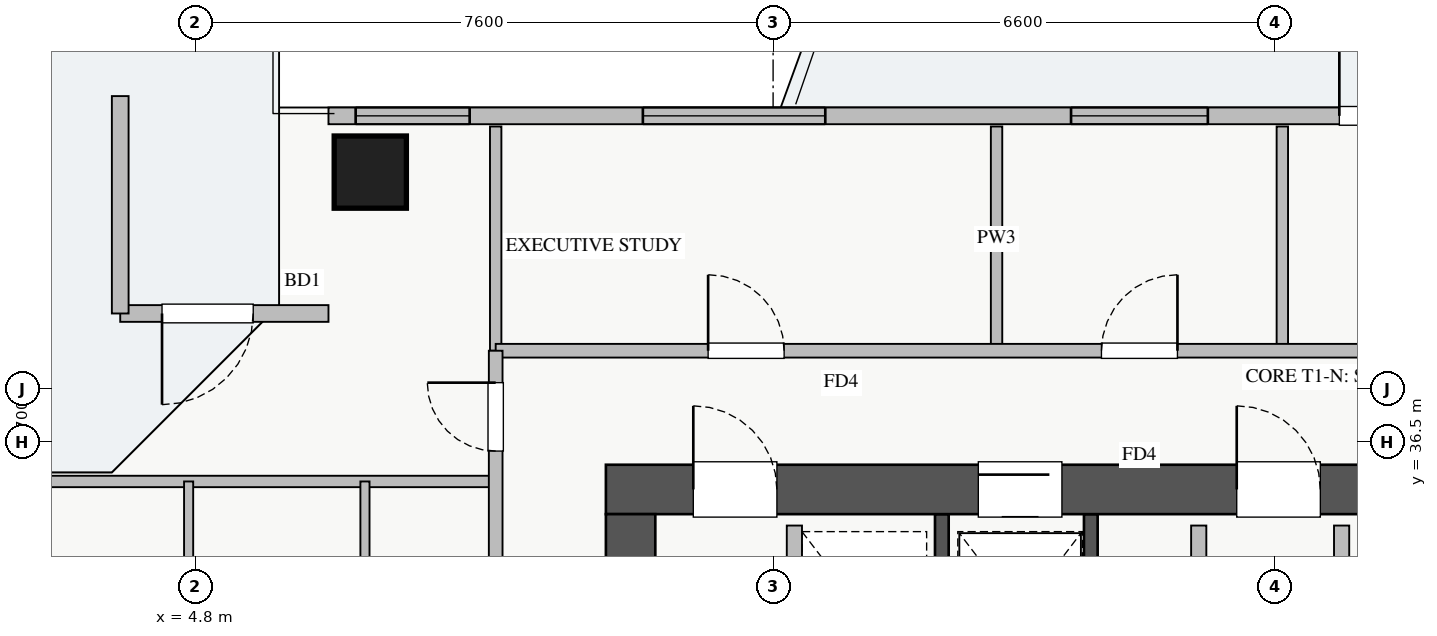
"""IFC4 building model, lengths in metres.
Left out: names, types, materials, properties, quantities, classifications, styles, units other than length and angle.
Written with IfcOpenShell. Run it as: python <this file> out.ifc"""

import sys

from ifc_helpers import new_model, si_unit, direction, frame, frame_2d, origin, origin_2d, place, context, subcontext, project, spatial, rectangle, extrude, source, transform, mapped, element, fill, save


model = new_model("IFC4")
c1 = context("Model", 3, precision=1e-05, world=origin(), true_north=direction((0.0, 1.0)))
c2 = subcontext(c1, "Body", "Model", "MODEL_VIEW")
j1 = project(units=[si_unit("LENGTHUNIT", "METRE"), si_unit("PLANEANGLEUNIT", "RADIAN")], contexts=[c1])
p1 = place(None, origin())
s1 = spatial("IfcSite", under=j1, at=p1, CompositionType="ELEMENT")
p2 = place(p1, origin())
s2 = spatial("IfcBuilding", under=s1, at=p2, CompositionType="ELEMENT")
p3 = place(p2, frame((0.0, 0.0, 143.75)))
s3 = spatial("IfcBuildingStorey", under=s2, at=p3, CompositionType="ELEMENT", Elevation=143.75)
for number, where, z_axis, x_axis in (
    (1, (14.62, 33.2, 0.0), (0.0, 0.0, 1.0), (0.0, 1.0, 0.0)),
    (2, (16.58, 33.2, 0.0), (0.0, 0.0, 1.0), (0.0, 1.0, 0.0)),
):
    element("IfcWall", number, at=place(p3, frame(where, z_axis=z_axis, x_axis=x_axis)), inside=s3, PredefinedType="SHEAR", context=c2, shape_type="SweptSolid", body=[
        extrude(rectangle(XDim=2.35, YDim=0.18, at=frame_2d((1.175, 0.0))), origin(), (0.0, 0.0, 1.0), 3.07),
    ])
p4 = place(p3, frame((10.2, 35.875, 0.0), z_axis=(0.0, 0.0, 1.0), x_axis=(1.0, 0.0, 0.0)))
e3 = element("IfcWall", 3, at=p4, inside=s3, PredefinedType="SHEAR", context=c2, shape_type="SweptSolid", body=[
    extrude(rectangle(XDim=17.6, YDim=0.65, at=frame_2d((8.8, 0.0))), origin(), (0.0, 0.0, 1.0), 3.25),
])
p5 = place(p4, frame((1.15, 0.0, 0.0)))
e4 = element("IfcOpeningElement", 4, at=p5, cuts=e3, PredefinedType="OPENING", context=c2, shape_type="SweptSolid", body=[
    extrude(rectangle(XDim=1.1, YDim=2.05, at=frame_2d((0.55, 1.025))), frame((0.0, 0.335, 0.0), z_axis=(0.0, -1.0, 0.0), x_axis=(1.0, 0.0, 0.0)), (0.0, 0.0, 1.0), 0.67),
])
p6 = place(p4, frame((8.3, 0.0, 0.0)))
e5 = element("IfcOpeningElement", 5, at=p6, cuts=e3, PredefinedType="OPENING", context=c2, shape_type="SweptSolid", body=[
    extrude(rectangle(XDim=1.1, YDim=2.05, at=frame_2d((0.55, 1.025))), frame((0.0, 0.335, 0.0), z_axis=(0.0, -1.0, 0.0), x_axis=(1.0, 0.0, 0.0)), (0.0, 0.0, 1.0), 0.67),
])
p7 = place(p4, frame((4.9, 0.0, 0.0)))
e6 = element("IfcOpeningElement", 6, at=p7, cuts=e3, PredefinedType="OPENING", context=c2, shape_type="SweptSolid", body=[
    extrude(rectangle(XDim=1.1, YDim=2.05, at=frame_2d((0.55, 1.025))), frame((0.0, 0.335, 0.0), z_axis=(0.0, -1.0, 0.0), x_axis=(1.0, 0.0, 0.0)), (0.0, 0.0, 1.0), 0.67),
])
p8 = place(p4, frame((14.74, 0.0, 0.0)))
e7 = element("IfcOpeningElement", 7, at=p8, cuts=e3, PredefinedType="OPENING", context=c2, shape_type="SweptSolid", body=[
    extrude(rectangle(XDim=1.0, YDim=2.05, at=frame_2d((0.5, 1.025))), frame((0.0, 0.335, 0.0), z_axis=(0.0, -1.0, 0.0), x_axis=(1.0, 0.0, 0.0)), (0.0, 0.0, 1.0), 0.67),
])
p9 = place(p4, frame((10.005, 0.0, 0.0)))
e8 = element("IfcOpeningElement", 8, at=p9, cuts=e3, PredefinedType="OPENING", context=c2, shape_type="SweptSolid", body=[
    extrude(rectangle(XDim=1.0, YDim=2.05, at=frame_2d((0.5, 1.025))), frame((0.0, 0.335, 0.0), z_axis=(0.0, -1.0, 0.0), x_axis=(1.0, 0.0, 0.0)), (0.0, 0.0, 1.0), 0.67),
])
p10 = place(p4, frame((11.55, 0.0, 0.0)))
e9 = element("IfcOpeningElement", 9, at=p10, cuts=e3, PredefinedType="OPENING", context=c2, shape_type="SweptSolid", body=[
    extrude(rectangle(XDim=1.0, YDim=2.05, at=frame_2d((0.5, 1.025))), frame((0.0, 0.335, 0.0), z_axis=(0.0, -1.0, 0.0), x_axis=(1.0, 0.0, 0.0)), (0.0, 0.0, 1.0), 0.67),
])
p11 = place(p4, frame((13.215, 0.0, 0.0)))
e10 = element("IfcOpeningElement", 10, at=p11, cuts=e3, PredefinedType="OPENING", context=c2, shape_type="SweptSolid", body=[
    extrude(rectangle(XDim=1.0, YDim=2.05, at=frame_2d((0.5, 1.025))), frame((0.0, 0.335, 0.0), z_axis=(0.0, -1.0, 0.0), x_axis=(1.0, 0.0, 0.0)), (0.0, 0.0, 1.0), 0.67),
])
p12 = place(p3, frame((10.525, 29.65, 0.0), z_axis=(0.0, 0.0, 1.0), x_axis=(0.0, 1.0, 0.0)))
e11 = element("IfcWall", 11, at=p12, inside=s3, PredefinedType="SHEAR", context=c2, shape_type="SweptSolid", body=[
    extrude(rectangle(XDim=5.9, YDim=0.65, at=frame_2d((2.95, 0.0))), origin(), (0.0, 0.0, 1.0), 3.25),
])
m1 = source(origin(), c2, "Body", "SweptSolid", [
    extrude(rectangle(XDim=0.95, YDim=0.95, at=origin_2d()), origin(), (0.0, 0.0, 1.0), 3.25),
])
p13 = place(p3, frame((7.1, 40.05, 0.0), z_axis=(0.0, 0.0, 1.0), x_axis=(1.0, 0.0, 0.0)))
e12 = element("IfcColumn", 12, at=p13, inside=s3, PredefinedType="COLUMN", context=c2, shape_type="MappedRepresentation", body=[
    mapped(m1, transform((0.0, 0.0, 0.0), x_axis=(1.0, 0.0, 0.0), y_axis=(0.0, 1.0, 0.0), z_axis=(0.0, 0.0, 1.0), scale=1.0)),
])
p14 = place(p3, frame((6.55, 40.79, 0.0), z_axis=(0.0, 0.0, 1.0), x_axis=(1.0, 0.0, 0.0)))
e13 = element("IfcWall", 13, at=p14, inside=s3, PredefinedType="STANDARD", context=c2, shape_type="SweptSolid", body=[
    extrude(rectangle(XDim=24.9, YDim=0.22, at=frame_2d((12.45, 0.0))), origin(), (0.0, 0.0, 1.0), 2.61),
])
p15 = place(p14, frame((13.3, 0.0, 0.0)))
e14 = element("IfcOpeningElement", 14, at=p15, cuts=e13, PredefinedType="OPENING", context=c2, shape_type="SweptSolid", body=[
    extrude(rectangle(XDim=1.2, YDim=2.1, at=frame_2d((0.6, 1.05))), frame((0.0, 0.12, 0.0), z_axis=(0.0, -1.0, 0.0), x_axis=(1.0, 0.0, 0.0)), (0.0, 0.0, 1.0), 0.24),
])
p16 = place(p14, frame((0.357, 0.0, 0.9)))
e15 = element("IfcOpeningElement", 15, at=p16, cuts=e13, PredefinedType="OPENING", context=c2, shape_type="SweptSolid", body=[
    extrude(rectangle(XDim=1.5, YDim=1.5, at=frame_2d((0.75, 0.75))), frame((0.0, 0.12, 0.0), z_axis=(0.0, -1.0, 0.0), x_axis=(1.0, 0.0, 0.0)), (0.0, 0.0, 1.0), 0.24),
])
p17 = place(p14, frame((9.77, 0.0, 0.9)))
e16 = element("IfcOpeningElement", 16, at=p17, cuts=e13, PredefinedType="OPENING", context=c2, shape_type="SweptSolid", body=[
    extrude(rectangle(XDim=1.8, YDim=1.5, at=frame_2d((0.9, 0.75))), frame((0.0, 0.12, 0.0), z_axis=(0.0, -1.0, 0.0), x_axis=(1.0, 0.0, 0.0)), (0.0, 0.0, 1.0), 0.24),
])
p18 = place(p14, frame((14.813, 0.0, 0.9)))
e17 = element("IfcOpeningElement", 17, at=p18, cuts=e13, PredefinedType="OPENING", context=c2, shape_type="SweptSolid", body=[
    extrude(rectangle(XDim=1.5, YDim=1.45, at=frame_2d((0.75, 0.725))), frame((0.0, 0.12, 0.0), z_axis=(0.0, -1.0, 0.0), x_axis=(1.0, 0.0, 0.0)), (0.0, 0.0, 1.0), 0.24),
])
p19 = place(p14, frame((20.738, 0.0, 0.9)))
e18 = element("IfcOpeningElement", 18, at=p19, cuts=e13, PredefinedType="OPENING", context=c2, shape_type="SweptSolid", body=[
    extrude(rectangle(XDim=2.1, YDim=1.48, at=frame_2d((1.05, 0.74))), frame((0.0, 0.12, 0.0), z_axis=(0.0, -1.0, 0.0), x_axis=(1.0, 0.0, 0.0)), (0.0, 0.0, 1.0), 0.24),
])
p20 = place(p14, frame((4.136, 0.0, 0.9)))
e19 = element("IfcOpeningElement", 19, at=p20, cuts=e13, PredefinedType="OPENING", context=c2, shape_type="SweptSolid", body=[
    extrude(rectangle(XDim=2.4, YDim=1.5, at=frame_2d((1.2, 0.75))), frame((0.0, 0.12, 0.0), z_axis=(0.0, -1.0, 0.0), x_axis=(1.0, 0.0, 0.0)), (0.0, 0.0, 1.0), 0.24),
])
p21 = place(p3, frame((3.81, 38.19, 0.0), z_axis=(0.0, 0.0, 1.0), x_axis=(1.0, 0.0, 0.0)))
e20 = element("IfcWall", 20, at=p21, inside=s3, PredefinedType="STANDARD", context=c2, shape_type="SweptSolid", body=[
    extrude(rectangle(XDim=2.74, YDim=0.22, at=frame_2d((1.37, 0.0))), origin(), (0.0, 0.0, 1.0), 2.61),
])
p22 = place(p21, frame((0.55, 0.0, 0.0)))
e21 = element("IfcOpeningElement", 21, at=p22, cuts=e20, PredefinedType="OPENING", context=c2, shape_type="SweptSolid", body=[
    extrude(rectangle(XDim=1.2, YDim=2.1, at=frame_2d((0.6, 1.05))), frame((0.0, 0.12, 0.0), z_axis=(0.0, -1.0, 0.0), x_axis=(1.0, 0.0, 0.0)), (0.0, 0.0, 1.0), 0.24),
])
p23 = place(p3, frame((3.81, 38.19, 0.0), z_axis=(0.0, 0.0, 1.0), x_axis=(0.0, 1.0, 0.0)))
e22 = element("IfcWall", 22, at=p23, inside=s3, PredefinedType="STANDARD", context=c2, shape_type="SweptSolid", body=[
    extrude(rectangle(XDim=2.86, YDim=0.22, at=frame_2d((1.43, 0.0))), origin(), (0.0, 0.0, 1.0), 2.61),
])
for number, where, z_axis, x_axis in (
    (23, (12.68, 33.19, 0.0), (0.0, 0.0, 1.0), (0.0, 1.0, 0.0)),
    (24, (18.0, 33.19, 0.0), (0.0, 0.0, 1.0), (0.0, 1.0, 0.0)),
    (25, (19.88, 33.19, 0.0), (0.0, 0.0, 1.0), (0.0, 1.0, 0.0)),
):
    element("IfcWall", number, at=place(p3, frame(where, z_axis=z_axis, x_axis=x_axis)), inside=s3, PredefinedType="PARTITIONING", context=c2, shape_type="SweptSolid", body=[
        extrude(rectangle(XDim=2.21, YDim=0.2, at=frame_2d((1.105, 0.0))), origin(), (0.0, 0.0, 1.0), 3.07),
    ])
p24 = place(p3, frame((15.34, 37.7, 0.0), z_axis=(0.0, 0.0, 1.0), x_axis=(0.0, 1.0, 0.0)))
e26 = element("IfcWall", 26, at=p24, inside=s3, PredefinedType="PARTITIONING", context=c2, shape_type="SweptSolid", body=[
    extrude(rectangle(XDim=2.95, YDim=0.15, at=frame_2d((1.475, 0.0))), origin(), (0.0, 0.0, 1.0), 3.07),
])
p25 = place(p3, frame((19.1, 37.7, 0.0), z_axis=(0.0, 0.0, 1.0), x_axis=(0.0, 1.0, 0.0)))
e27 = element("IfcWall", 27, at=p25, inside=s3, PredefinedType="PARTITIONING", context=c2, shape_type="SweptSolid", body=[
    extrude(rectangle(XDim=2.95, YDim=0.15, at=frame_2d((1.475, 0.0))), origin(), (0.0, 0.0, 1.0), 2.865),
])
p26 = place(p3, frame((8.75, 37.7, 0.0), z_axis=(0.0, 0.0, 1.0), x_axis=(0.0, 1.0, 0.0)))
e28 = element("IfcWall", 28, at=p26, inside=s3, PredefinedType="PARTITIONING", context=c2, shape_type="SweptSolid", body=[
    extrude(rectangle(XDim=2.95, YDim=0.15, at=frame_2d((1.475, 0.0))), origin(), (0.0, 0.0, 1.0), 3.07),
])
p27 = place(p3, frame((8.75, 37.7, 0.0), z_axis=(0.0, 0.0, 1.0), x_axis=(1.0, 0.0, 0.0)))
e29 = element("IfcWall", 29, at=p27, inside=s3, PredefinedType="PARTITIONING", context=c2, shape_type="SweptSolid", body=[
    extrude(rectangle(XDim=23.61, YDim=0.18, at=frame_2d((11.805, 0.0))), origin(), (0.0, 0.0, 1.0), 3.07),
])
p28 = place(p27, frame((2.795, 0.0, 0.0)))
e30 = element("IfcOpeningElement", 30, at=p28, cuts=e29, PredefinedType="OPENING", context=c2, shape_type="SweptSolid", body=[
    extrude(rectangle(XDim=1.0, YDim=2.05, at=frame_2d((0.5, 1.025))), frame((0.0, 0.1, 0.0), z_axis=(0.0, -1.0, 0.0), x_axis=(1.0, 0.0, 0.0)), (0.0, 0.0, 1.0), 0.2),
])
p29 = place(p27, frame((7.97, 0.0, 0.0)))
e31 = element("IfcOpeningElement", 31, at=p29, cuts=e29, PredefinedType="OPENING", context=c2, shape_type="SweptSolid", body=[
    extrude(rectangle(XDim=1.0, YDim=2.05, at=frame_2d((0.5, 1.025))), frame((0.0, 0.1, 0.0), z_axis=(0.0, -1.0, 0.0), x_axis=(1.0, 0.0, 0.0)), (0.0, 0.0, 1.0), 0.2),
])
p30 = place(p27, frame((13.385, 0.0, 0.0)))
e32 = element("IfcOpeningElement", 32, at=p30, cuts=e29, PredefinedType="OPENING", context=c2, shape_type="SweptSolid", body=[
    extrude(rectangle(XDim=1.0, YDim=2.05, at=frame_2d((0.5, 1.025))), frame((0.0, 0.1, 0.0), z_axis=(0.0, -1.0, 0.0), x_axis=(1.0, 0.0, 0.0)), (0.0, 0.0, 1.0), 0.2),
])
p31 = place(p27, frame((19.825, 0.0, 0.0)))
e33 = element("IfcOpeningElement", 33, at=p31, cuts=e29, PredefinedType="OPENING", context=c2, shape_type="SweptSolid", body=[
    extrude(rectangle(XDim=1.0, YDim=2.05, at=frame_2d((0.5, 1.025))), frame((0.0, 0.1, 0.0), z_axis=(0.0, -1.0, 0.0), x_axis=(1.0, 0.0, 0.0)), (0.0, 0.0, 1.0), 0.2),
])
p32 = place(p3, frame((1.35, 35.98, 0.0), z_axis=(0.0, 0.0, 1.0), x_axis=(1.0, 0.0, 0.0)))
e34 = element("IfcWall", 34, at=p32, inside=s3, PredefinedType="PARTITIONING", context=c2, shape_type="SweptSolid", body=[
    extrude(rectangle(XDim=7.4, YDim=0.15, at=frame_2d((3.7, 0.0))), origin(), (0.0, 0.0, 1.0), 3.07),
])
p33 = place(p3, frame((4.71, 31.42, 0.0), z_axis=(0.0, 0.0, 1.0), x_axis=(0.0, 1.0, 0.0)))
e35 = element("IfcWall", 35, at=p33, inside=s3, PredefinedType="PLUMBINGWALL", context=c2, shape_type="SweptSolid", body=[
    extrude(rectangle(XDim=4.56, YDim=0.12, at=frame_2d((2.28, 0.0))), origin(), (0.0, 0.0, 1.0), 3.07),
])
p34 = place(p3, frame((7.03, 31.42, 0.0), z_axis=(0.0, 0.0, 1.0), x_axis=(0.0, 1.0, 0.0)))
e36 = element("IfcWall", 36, at=p34, inside=s3, PredefinedType="PLUMBINGWALL", context=c2, shape_type="SweptSolid", body=[
    extrude(rectangle(XDim=4.56, YDim=0.12, at=frame_2d((2.28, 0.0))), origin(), (0.0, 0.0, 1.0), 2.577),
])
p35 = place(p3, frame((8.75, 8.3, 0.0), z_axis=(0.0, 0.0, 1.0), x_axis=(0.0, 1.0, 0.0)))
e37 = element("IfcWall", 37, at=p35, inside=s3, PredefinedType="PARTITIONING", context=c2, shape_type="SweptSolid", body=[
    extrude(rectangle(XDim=29.4, YDim=0.18, at=frame_2d((14.7, 0.0))), origin(), (0.0, 0.0, 1.0), 3.07),
])
p36 = place(p35, frame((28.08, 0.0, 0.0)))
e38 = element("IfcOpeningElement", 38, at=p36, cuts=e37, PredefinedType="OPENING", context=c2, shape_type="SweptSolid", body=[
    extrude(rectangle(XDim=0.9, YDim=2.05, at=frame_2d((0.45, 1.025))), frame((0.0, 0.1, 0.0), z_axis=(0.0, -1.0, 0.0), x_axis=(1.0, 0.0, 0.0)), (0.0, 0.0, 1.0), 0.2),
])
p37 = place(p35, frame((0.245, 0.0, 0.0)))
e39 = element("IfcOpeningElement", 39, at=p37, cuts=e37, PredefinedType="OPENING", context=c2, shape_type="SweptSolid", body=[
    extrude(rectangle(XDim=0.9, YDim=2.05, at=frame_2d((0.45, 1.025))), frame((0.0, 0.1, 0.0), z_axis=(0.0, -1.0, 0.0), x_axis=(1.0, 0.0, 0.0)), (0.0, 0.0, 1.0), 0.2),
])
p38 = place(p35, frame((5.0, 0.0, 0.0)))
e40 = element("IfcOpeningElement", 40, at=p38, cuts=e37, PredefinedType="OPENING", context=c2, shape_type="SweptSolid", body=[
    extrude(rectangle(XDim=1.0, YDim=2.05, at=frame_2d((0.5, 1.025))), frame((0.0, 0.1, 0.0), z_axis=(0.0, -1.0, 0.0), x_axis=(1.0, 0.0, 0.0)), (0.0, 0.0, 1.0), 0.2),
])
p39 = place(p35, frame((11.165, 0.0, 0.0)))
e41 = element("IfcOpeningElement", 41, at=p39, cuts=e37, PredefinedType="OPENING", context=c2, shape_type="SweptSolid", body=[
    extrude(rectangle(XDim=1.0, YDim=2.05, at=frame_2d((0.5, 1.025))), frame((0.0, 0.1, 0.0), z_axis=(0.0, -1.0, 0.0), x_axis=(1.0, 0.0, 0.0)), (0.0, 0.0, 1.0), 0.2),
])
p40 = place(p35, frame((20.325, 0.0, 0.0)))
e42 = element("IfcOpeningElement", 42, at=p40, cuts=e37, PredefinedType="OPENING", context=c2, shape_type="SweptSolid", body=[
    extrude(rectangle(XDim=1.0, YDim=2.05, at=frame_2d((0.5, 1.025))), frame((0.0, 0.1, 0.0), z_axis=(0.0, -1.0, 0.0), x_axis=(1.0, 0.0, 0.0)), (0.0, 0.0, 1.0), 0.2),
])
m2 = source(origin(), c2, "Body", "SweptSolid", [
    extrude(rectangle(XDim=1.2, YDim=2.1, at=frame_2d((0.6, 1.05))), frame((0.0, 0.025, 0.0), z_axis=(0.0, -1.0, 0.0), x_axis=(1.0, 0.0, 0.0)), (0.0, 0.0, 1.0), 0.05),
])
p41 = place(p15, origin())
e43 = element("IfcDoor", 43, at=p41, inside=s3, OperationType="SINGLE_SWING_LEFT", PredefinedType="DOOR", context=c2, shape_type="MappedRepresentation", body=[
    mapped(m2, transform((0.0, 0.0, 0.0), x_axis=(1.0, 0.0, 0.0), y_axis=(0.0, 1.0, 0.0), z_axis=(0.0, 0.0, 1.0), scale=1.0)),
])
fill(e14, e43)
m3 = source(origin(), c2, "Body", "SweptSolid", [
    extrude(rectangle(XDim=1.5, YDim=1.5, at=frame_2d((0.75, 0.75))), frame((0.0, 0.03, 0.0), z_axis=(0.0, -1.0, 0.0), x_axis=(1.0, 0.0, 0.0)), (0.0, 0.0, 1.0), 0.06),
])
p42 = place(p16, origin())
e44 = element("IfcWindow", 44, at=p42, inside=s3, PartitioningType="TRIPLE_PANEL_VERTICAL", PredefinedType="WINDOW", context=c2, shape_type="MappedRepresentation", body=[
    mapped(m3, transform((0.0, 0.0, 0.0), x_axis=(1.0, 0.0, 0.0), y_axis=(0.0, 1.0, 0.0), z_axis=(0.0, 0.0, 1.0), scale=1.0)),
])
fill(e15, e44)
m4 = source(origin(), c2, "Body", "SweptSolid", [
    extrude(rectangle(XDim=1.8, YDim=1.5, at=frame_2d((0.9, 0.75))), frame((0.0, 0.03, 0.0), z_axis=(0.0, -1.0, 0.0), x_axis=(1.0, 0.0, 0.0)), (0.0, 0.0, 1.0), 0.06),
])
p43 = place(p17, origin())
e45 = element("IfcWindow", 45, at=p43, inside=s3, PartitioningType="DOUBLE_PANEL_VERTICAL", PredefinedType="WINDOW", context=c2, shape_type="MappedRepresentation", body=[
    mapped(m4, transform((0.0, 0.0, 0.0), x_axis=(1.0, 0.0, 0.0), y_axis=(0.0, 1.0, 0.0), z_axis=(0.0, 0.0, 1.0), scale=1.0)),
])
fill(e16, e45)
p44 = place(p22, frame((1.2, 0.0, 0.0), z_axis=(0.0, 0.0, 1.0), x_axis=(-1.0, 0.0, 0.0)))
e46 = element("IfcDoor", 46, at=p44, inside=s3, OperationType="SINGLE_SWING_LEFT", PredefinedType="DOOR", context=c2, shape_type="MappedRepresentation", body=[
    mapped(m2, transform((0.0, 0.0, 0.0), x_axis=(1.0, 0.0, 0.0), y_axis=(0.0, 1.0, 0.0), z_axis=(0.0, 0.0, 1.0), scale=1.0)),
])
fill(e21, e46)
m5 = source(origin(), c2, "Body", "SweptSolid", [
    extrude(rectangle(XDim=1.1, YDim=2.05, at=frame_2d((0.55, 1.025))), frame((0.0, 0.025, 0.0), z_axis=(0.0, -1.0, 0.0), x_axis=(1.0, 0.0, 0.0)), (0.0, 0.0, 1.0), 0.05),
])
p45 = place(p5, origin())
e47 = element("IfcDoor", 47, at=p45, inside=s3, OperationType="SINGLE_SWING_LEFT", PredefinedType="DOOR", context=c2, shape_type="MappedRepresentation", body=[
    mapped(m5, transform((0.0, 0.0, 0.0), x_axis=(1.0, 0.0, 0.0), y_axis=(0.0, 1.0, 0.0), z_axis=(0.0, 0.0, 1.0), scale=1.0)),
])
fill(e4, e47)
p46 = place(p6, origin())
e48 = element("IfcDoor", 48, at=p46, inside=s3, OperationType="SINGLE_SWING_LEFT", PredefinedType="DOOR", context=c2, shape_type="MappedRepresentation", body=[
    mapped(m5, transform((0.0, 0.0, 0.0), x_axis=(1.0, 0.0, 0.0), y_axis=(0.0, 1.0, 0.0), z_axis=(0.0, 0.0, 1.0), scale=1.0)),
])
fill(e5, e48)
p47 = place(p7, origin())
e49 = element("IfcDoor", 49, at=p47, inside=s3, OperationType="SLIDING_TO_LEFT", PredefinedType="DOOR", context=c2, shape_type="MappedRepresentation", body=[
    mapped(m5, transform((0.0, 0.0, 0.0), x_axis=(1.0, 0.0, 0.0), y_axis=(0.0, 1.0, 0.0), z_axis=(0.0, 0.0, 1.0), scale=1.0)),
])
fill(e6, e49)
m6 = source(origin(), c2, "Body", "SweptSolid", [
    extrude(rectangle(XDim=1.0, YDim=2.05, at=frame_2d((0.5, 1.025))), frame((0.0, 0.025, 0.0), z_axis=(0.0, -1.0, 0.0), x_axis=(1.0, 0.0, 0.0)), (0.0, 0.0, 1.0), 0.05),
])
p48 = place(p28, origin())
e50 = element("IfcDoor", 50, at=p48, inside=s3, OperationType="SINGLE_SWING_LEFT", PredefinedType="DOOR", context=c2, shape_type="MappedRepresentation", body=[
    mapped(m6, transform((0.0, 0.0, 0.0), x_axis=(1.0, 0.0, 0.0), y_axis=(0.0, 1.0, 0.0), z_axis=(0.0, 0.0, 1.0), scale=1.0)),
])
fill(e30, e50)
p49 = place(p29, origin())
e51 = element("IfcDoor", 51, at=p49, inside=s3, OperationType="SINGLE_SWING_RIGHT", PredefinedType="DOOR", context=c2, shape_type="MappedRepresentation", body=[
    mapped(m6, transform((0.0, 0.0, 0.0), x_axis=(1.0, 0.0, 0.0), y_axis=(0.0, 1.0, 0.0), z_axis=(0.0, 0.0, 1.0), scale=1.0)),
])
fill(e31, e51)
m7 = source(origin(), c2, "Body", "SweptSolid", [
    extrude(rectangle(XDim=0.9, YDim=2.05, at=frame_2d((0.45, 1.025))), frame((0.0, 0.025, 0.0), z_axis=(0.0, -1.0, 0.0), x_axis=(1.0, 0.0, 0.0)), (0.0, 0.0, 1.0), 0.05),
])
p50 = place(p36, origin())
e52 = element("IfcDoor", 52, at=p50, inside=s3, OperationType="SINGLE_SWING_RIGHT", PredefinedType="DOOR", context=c2, shape_type="MappedRepresentation", body=[
    mapped(m7, transform((0.0, 0.0, 0.0), x_axis=(1.0, 0.0, 0.0), y_axis=(0.0, 1.0, 0.0), z_axis=(0.0, 0.0, 1.0), scale=1.0)),
])
fill(e38, e52)
m8 = source(origin(), c2, "Body", "SweptSolid", [
    extrude(rectangle(XDim=2.4, YDim=1.5, at=frame_2d((1.2, 0.75))), frame((0.0, 0.03, 0.0), z_axis=(0.0, -1.0, 0.0), x_axis=(1.0, 0.0, 0.0)), (0.0, 0.0, 1.0), 0.06),
])
p51 = place(p20, origin())
e53 = element("IfcWindow", 53, at=p51, inside=s3, PartitioningType="TRIPLE_PANEL_VERTICAL", PredefinedType="WINDOW", context=c2, shape_type="MappedRepresentation", body=[
    mapped(m8, transform((0.0, 0.0, 0.0), x_axis=(1.0, 0.0, 0.0), y_axis=(0.0, 1.0, 0.0), z_axis=(0.0, 0.0, 1.0), scale=1.0)),
])
fill(e19, e53)
save(model, sys.argv[1])
